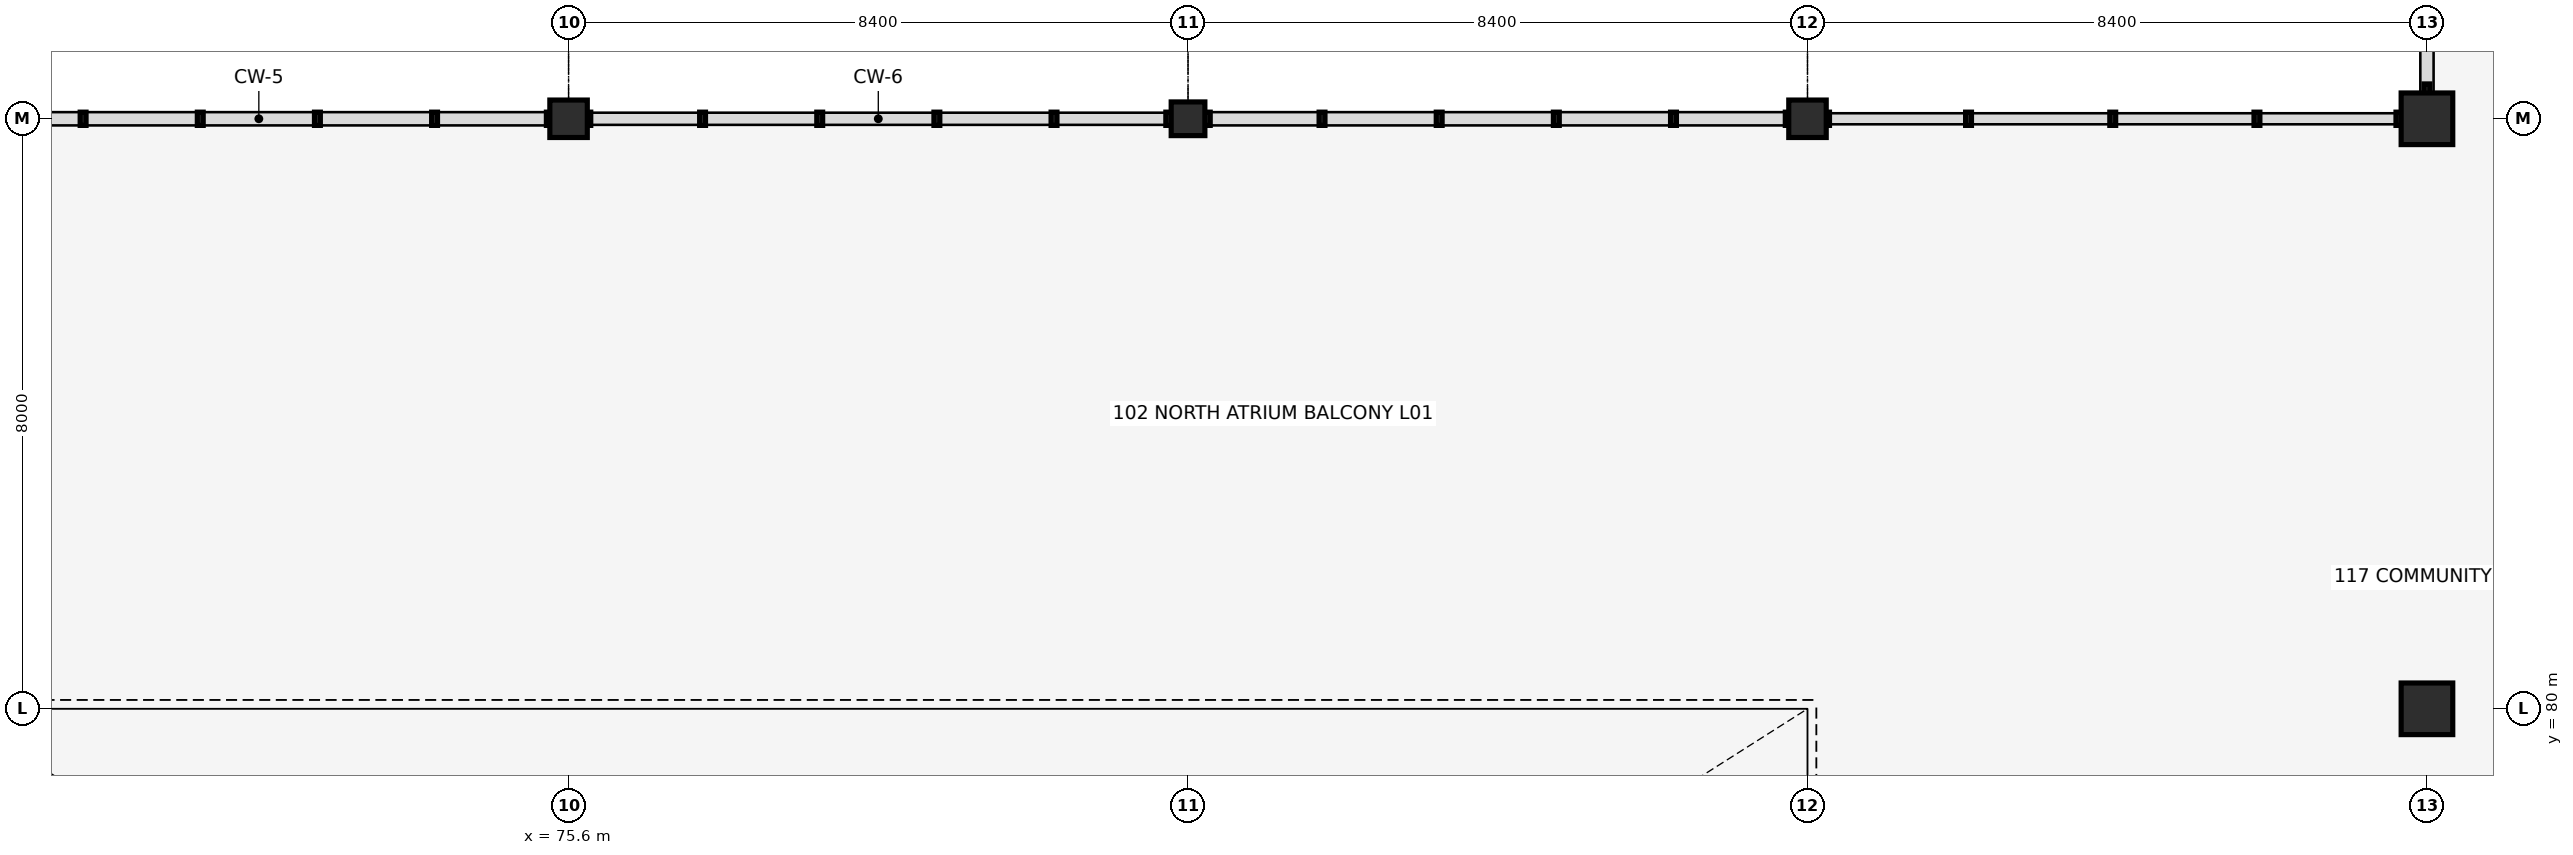
"""IFC4 building model, lengths in metres.
Left out: names, types, materials, properties, quantities, classifications, styles, units other than length and angle.
Written with IfcOpenShell. Run it as: python <this file> out.ifc"""

import sys

from ifc_helpers import new_model, si_unit, direction, frame, origin, origin_2d, place, context, subcontext, project, spatial, rectangle, hollow_circle, extrude, element, save


model = new_model("IFC4")
c1 = context("Model", 3, precision=1e-05, world=origin(), true_north=direction((0.0, 1.0)))
c2 = subcontext(c1, "Body", "Model", "MODEL_VIEW")
j1 = project(units=[si_unit("LENGTHUNIT", "METRE"), si_unit("PLANEANGLEUNIT", "RADIAN")], contexts=[c1])
p1 = place(None, origin())
s1 = spatial("IfcSite", under=j1, at=p1, CompositionType="ELEMENT")
p2 = place(p1, origin())
s2 = spatial("IfcBuilding", under=s1, at=p2, CompositionType="ELEMENT")
p3 = place(p2, frame((0.0, 0.0, 5.44)))
s3 = spatial("IfcBuildingStorey", under=s2, at=p3, CompositionType="ELEMENT", Elevation=5.44)
p4 = place(p3, frame((75.6, 88.0, 0.0), z_axis=(0.0, 0.0, 1.0), x_axis=(1.0, 0.0, 0.0)))
e1 = element("IfcColumn", 1, at=p4, inside=s3, PredefinedType="COLUMN", context=c2, shape_type="SweptSolid", body=[
    extrude(hollow_circle(Radius=0.229, WallThickness=0.016, at=origin_2d()), origin(), (0.0, 0.0, 1.0), 11.288),
])
p5 = place(p3, frame((84.0, 88.0, 0.0), z_axis=(0.0, 0.0, 1.0), x_axis=(1.0, 0.0, 0.0)))
e2 = element("IfcColumn", 2, at=p5, inside=s3, PredefinedType="COLUMN", context=c2, shape_type="SweptSolid", body=[
    extrude(hollow_circle(Radius=0.229, WallThickness=0.016, at=origin_2d()), origin(), (0.0, 0.0, 1.0), 11.318),
])
p6 = place(p3, frame((92.4, 88.0, 0.0), z_axis=(0.0, 0.0, 1.0), x_axis=(1.0, 0.0, 0.0)))
e3 = element("IfcColumn", 3, at=p6, inside=s3, PredefinedType="COLUMN", context=c2, shape_type="SweptSolid", body=[
    extrude(hollow_circle(Radius=0.229, WallThickness=0.016, at=origin_2d()), origin(), (0.0, 0.0, 1.0), 12.952),
])
for number, where, z_axis, x_axis in (
    (4, (100.8, 80.0, 0.0), (0.0, 0.0, 1.0), (1.0, 0.0, 0.0)),
    (5, (100.8, 88.0, 0.0), (0.0, 0.0, 1.0), (1.0, 0.0, 0.0)),
):
    element("IfcColumn", number, at=place(p3, frame(where, z_axis=z_axis, x_axis=x_axis)), inside=s3, PredefinedType="COLUMN", context=c2, shape_type="SweptSolid", body=[
        extrude(rectangle(XDim=0.7, YDim=0.7, at=origin_2d()), origin(), (0.0, 0.0, 1.0), 3.8),
    ])
p7 = place(p3, frame((75.6, 88.0, 11.338), z_axis=(0.0, 0.105439497006, 0.994425719936), x_axis=(-1.0, 0.0, 0.0)))
e6 = element("IfcColumn", 6, at=p7, inside=s3, PredefinedType="COLUMN", context=c2, shape_type="SweptSolid", body=[
    extrude(hollow_circle(Radius=0.254, WallThickness=0.02, at=origin_2d()), origin(), (0.0, 0.0, 1.0), 2.846),
])
p8 = place(p3, frame((92.4, 88.0, 13.002), z_axis=(0.0, 0.105430502232, 0.994426673616), x_axis=(-1.0, 0.0, 0.0)))
e7 = element("IfcColumn", 7, at=p8, inside=s3, PredefinedType="COLUMN", context=c2, shape_type="SweptSolid", body=[
    extrude(hollow_circle(Radius=0.254, WallThickness=0.02, at=origin_2d()), origin(), (0.0, 0.0, 1.0), 2.846),
])
save(model, sys.argv[1])
